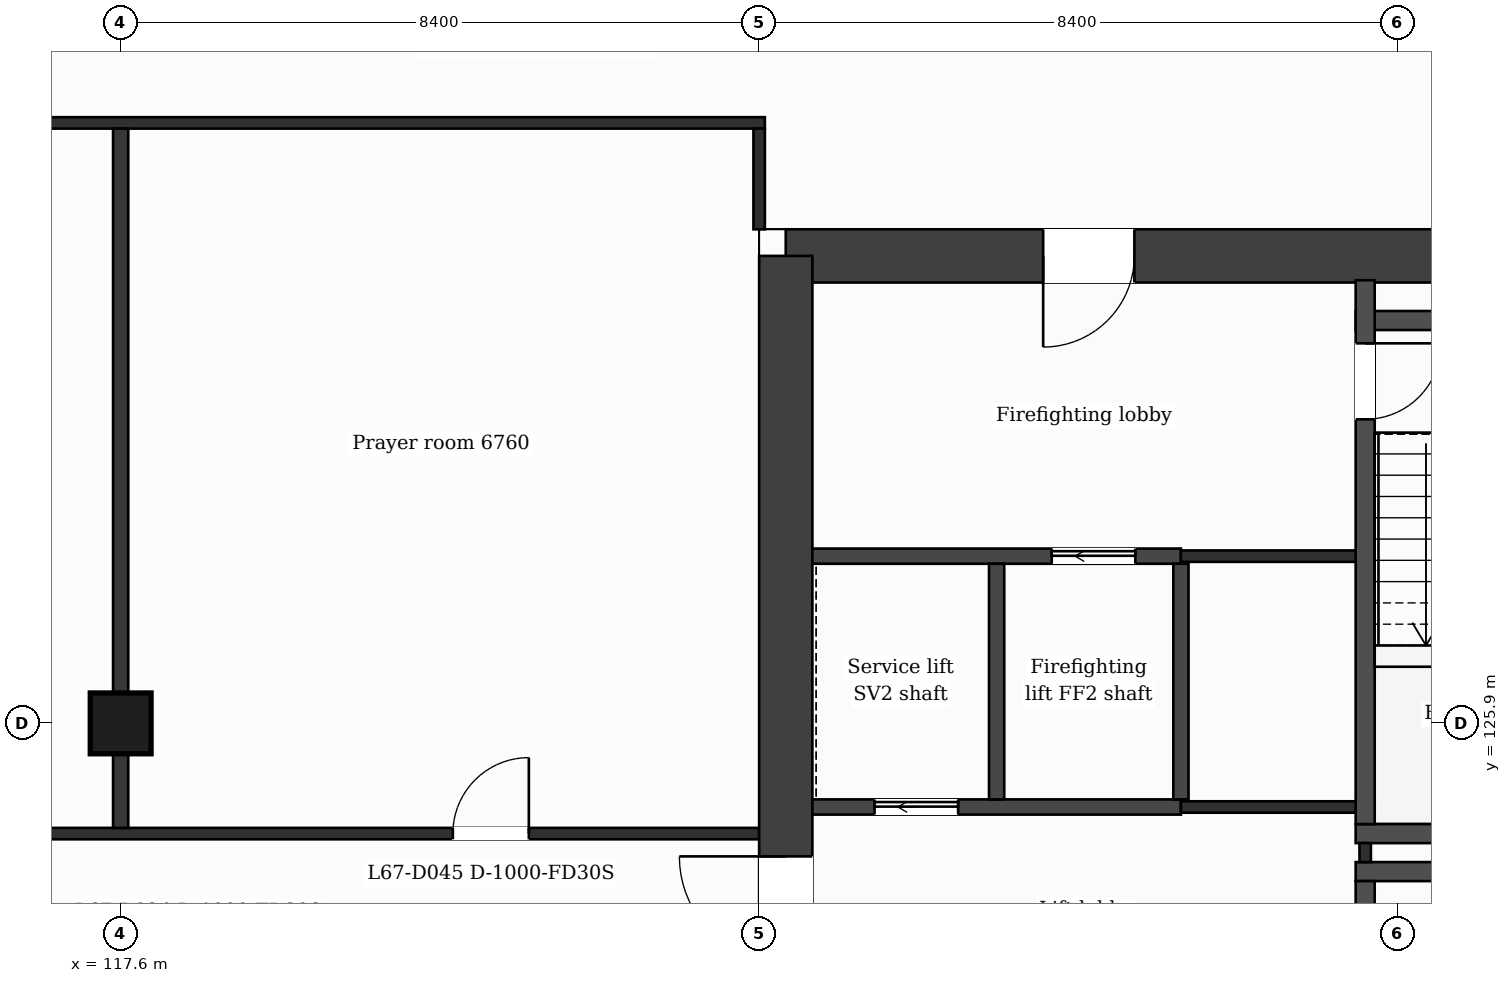
"""IFC4 building model, lengths in metres.
Left out: names, types, materials, properties, quantities, classifications, styles, units other than length and angle.
Written with IfcOpenShell. Run it as: python <this file> out.ifc"""

import sys

from ifc_helpers import new_model, si_unit, direction, frame, frame_2d, origin, origin_2d, place, context, subcontext, project, spatial, rectangle, extrude, element, fill, save


model = new_model("IFC4")
c1 = context("Model", 3, precision=1e-05, world=origin(), true_north=direction((0.0, 1.0)))
c2 = subcontext(c1, "Body", "Model", "MODEL_VIEW")
j1 = project(units=[si_unit("LENGTHUNIT", "METRE"), si_unit("PLANEANGLEUNIT", "RADIAN")], contexts=[c1])
p1 = place(None, origin())
s1 = spatial("IfcSite", under=j1, at=p1, CompositionType="ELEMENT")
p2 = place(p1, origin())
s2 = spatial("IfcBuilding", under=s1, at=p2, CompositionType="ELEMENT")
p3 = place(p2, frame((0.0, 0.0, 277.5)))
s3 = spatial("IfcBuildingStorey", under=s2, at=p3, CompositionType="ELEMENT", Elevation=277.5)
p4 = place(p3, frame((126.35, 132.05, 0.0), z_axis=(0.0, 0.0, 1.0), x_axis=(1.0, 0.0, 0.0)))
e1 = element("IfcWall", 1, at=p4, inside=s3, PredefinedType="SHEAR", context=c2, shape_type="SweptSolid", body=[
    extrude(rectangle(XDim=11.513, YDim=0.7, at=frame_2d((5.757, 0.0))), origin(), (0.0, 0.0, 1.0), 3.7),
])
p5 = place(p4, frame((3.386, 0.0, 0.0)))
e2 = element("IfcOpeningElement", 2, at=p5, cuts=e1, PredefinedType="OPENING", context=c2, shape_type="SweptSolid", body=[
    extrude(rectangle(XDim=1.2, YDim=2.1, at=frame_2d((0.6, 1.05))), frame((0.0, 0.36, 0.0), z_axis=(0.0, -1.0, 0.0), x_axis=(1.0, 0.0, 0.0)), (0.0, 0.0, 1.0), 0.72),
])
p6 = place(p3, frame((126.35, 110.75, 0.0), z_axis=(0.0, 0.0, 1.0), x_axis=(0.0, 1.0, 0.0)))
e3 = element("IfcWall", 3, at=p6, inside=s3, PredefinedType="SHEAR", context=c2, shape_type="SweptSolid", body=[
    extrude(rectangle(XDim=21.3, YDim=0.7, at=frame_2d((10.65, 0.0))), origin(), (0.0, 0.0, 1.0), 3.7),
])
p7 = place(p6, frame((12.0, 0.0, 0.0)))
e4 = element("IfcOpeningElement", 4, at=p7, cuts=e3, PredefinedType="OPENING", context=c2, shape_type="SweptSolid", body=[
    extrude(rectangle(XDim=1.4, YDim=2.1, at=frame_2d((0.7, 1.05))), frame((0.0, 0.36, 0.0), z_axis=(0.0, -1.0, 0.0), x_axis=(1.0, 0.0, 0.0)), (0.0, 0.0, 1.0), 0.72),
])
p8 = place(p3, frame((117.6, 125.9, 0.0), z_axis=(0.0, 0.0, 1.0), x_axis=(1.0, 0.0, 0.0)))
e5 = element("IfcColumn", 5, at=p8, inside=s3, PredefinedType="COLUMN", context=c2, shape_type="SweptSolid", body=[
    extrude(rectangle(XDim=0.8, YDim=0.8, at=origin_2d()), origin(), (0.0, 0.0, 1.0), 3.7),
])
for number, where, z_axis, x_axis in (
    (6, (133.848, 123.95, 0.0), (0.0, 0.0, 1.0), (1.0, 0.0, 0.0)),
    (7, (133.848, 124.45, 0.0), (0.0, 0.0, 1.0), (1.0, 0.0, 0.0)),
):
    element("IfcWall", number, at=place(p3, frame(where, z_axis=z_axis, x_axis=x_axis)), inside=s3, PredefinedType="PARTITIONING", context=c2, shape_type="SweptSolid", body=[
        extrude(rectangle(XDim=3.4, YDim=0.25, at=frame_2d((1.7, 0.0))), origin(), (0.0, 0.0, 1.0), 3.38),
    ])
p9 = place(p3, frame((100.8, 124.45, 0.0), z_axis=(0.0, 0.0, 1.0), x_axis=(1.0, 0.0, 0.0)))
e8 = element("IfcWall", 8, at=p9, inside=s3, PredefinedType="PARTITIONING", context=c2, shape_type="SweptSolid", body=[
    extrude(rectangle(XDim=25.2, YDim=0.15, at=frame_2d((12.6, 0.0))), origin(), (0.0, 0.0, 1.0), 3.38),
])
p10 = place(p9, frame((6.125, 0.0, 0.0)))
e9 = element("IfcOpeningElement", 9, at=p10, cuts=e8, PredefinedType="OPENING", context=c2, shape_type="SweptSolid", body=[
    extrude(rectangle(XDim=1.0, YDim=2.1, at=frame_2d((0.5, 1.05))), frame((0.0, 0.085, 0.0), z_axis=(0.0, -1.0, 0.0), x_axis=(1.0, 0.0, 0.0)), (0.0, 0.0, 1.0), 0.17),
])
p11 = place(p9, frame((1.325, 0.0, 0.0)))
e10 = element("IfcOpeningElement", 10, at=p11, cuts=e8, PredefinedType="OPENING", context=c2, shape_type="SweptSolid", body=[
    extrude(rectangle(XDim=1.0, YDim=2.1, at=frame_2d((0.5, 1.05))), frame((0.0, 0.085, 0.0), z_axis=(0.0, -1.0, 0.0), x_axis=(1.0, 0.0, 0.0)), (0.0, 0.0, 1.0), 0.17),
])
p12 = place(p9, frame((11.43, 0.0, 0.0)))
e11 = element("IfcOpeningElement", 11, at=p12, cuts=e8, PredefinedType="OPENING", context=c2, shape_type="SweptSolid", body=[
    extrude(rectangle(XDim=1.0, YDim=2.1, at=frame_2d((0.5, 1.05))), frame((0.0, 0.085, 0.0), z_axis=(0.0, -1.0, 0.0), x_axis=(1.0, 0.0, 0.0)), (0.0, 0.0, 1.0), 0.17),
])
p13 = place(p9, frame((21.17, 0.0, 0.0)))
e12 = element("IfcOpeningElement", 12, at=p13, cuts=e8, PredefinedType="OPENING", context=c2, shape_type="SweptSolid", body=[
    extrude(rectangle(XDim=1.0, YDim=2.1, at=frame_2d((0.5, 1.05))), frame((0.0, 0.085, 0.0), z_axis=(0.0, -1.0, 0.0), x_axis=(1.0, 0.0, 0.0)), (0.0, 0.0, 1.0), 0.17),
])
p14 = place(p3, frame((126.7, 124.8, 0.0), z_axis=(0.0, 0.0, 1.0), x_axis=(1.0, 0.0, 0.0)))
e13 = element("IfcWall", 13, at=p14, inside=s3, PredefinedType="PARTITIONING", context=c2, shape_type="SweptSolid", body=[
    extrude(rectangle(XDim=4.849, YDim=0.2, at=frame_2d((2.424, 0.0))), origin(), (0.0, 0.0, 1.0), 3.38),
])
p15 = place(p14, frame((0.818, 0.0, 0.0)))
e14 = element("IfcOpeningElement", 14, at=p15, cuts=e13, PredefinedType="OPENING", context=c2, shape_type="SweptSolid", body=[
    extrude(rectangle(XDim=1.1, YDim=2.1, at=frame_2d((0.55, 1.05))), frame((0.0, 0.11, 0.0), z_axis=(0.0, -1.0, 0.0), x_axis=(1.0, 0.0, 0.0)), (0.0, 0.0, 1.0), 0.22),
])
p16 = place(p3, frame((131.549, 124.8, 0.0), z_axis=(0.0, 0.0, 1.0), x_axis=(1.0, 0.0, 0.0)))
e15 = element("IfcWall", 15, at=p16, inside=s3, PredefinedType="PARTITIONING", context=c2, shape_type="SweptSolid", body=[
    extrude(rectangle(XDim=2.549, YDim=0.15, at=frame_2d((1.275, 0.0))), origin(), (0.0, 0.0, 1.0), 3.38),
])
p17 = place(p3, frame((126.7, 128.1, 0.0), z_axis=(0.0, 0.0, 1.0), x_axis=(1.0, 0.0, 0.0)))
e16 = element("IfcWall", 16, at=p17, inside=s3, PredefinedType="PARTITIONING", context=c2, shape_type="SweptSolid", body=[
    extrude(rectangle(XDim=4.849, YDim=0.2, at=frame_2d((2.424, 0.0))), origin(), (0.0, 0.0, 1.0), 3.38),
])
p18 = place(p17, frame((3.149, 0.0, 0.0)))
e17 = element("IfcOpeningElement", 17, at=p18, cuts=e16, PredefinedType="OPENING", context=c2, shape_type="SweptSolid", body=[
    extrude(rectangle(XDim=1.1, YDim=2.1, at=frame_2d((0.55, 1.05))), frame((0.0, 0.11, 0.0), z_axis=(0.0, -1.0, 0.0), x_axis=(1.0, 0.0, 0.0)), (0.0, 0.0, 1.0), 0.22),
])
p19 = place(p3, frame((131.549, 128.1, 0.0), z_axis=(0.0, 0.0, 1.0), x_axis=(1.0, 0.0, 0.0)))
e18 = element("IfcWall", 18, at=p19, inside=s3, PredefinedType="PARTITIONING", context=c2, shape_type="SweptSolid", body=[
    extrude(rectangle(XDim=2.424, YDim=0.15, at=frame_2d((1.212, 0.0))), origin(), (0.0, 0.0, 1.0), 3.38),
])
p20 = place(p3, frame((133.848, 131.2, 0.0), z_axis=(0.0, 0.0, 1.0), x_axis=(1.0, 0.0, 0.0)))
e19 = element("IfcWall", 19, at=p20, inside=s3, PredefinedType="PARTITIONING", context=c2, shape_type="SweptSolid", body=[
    extrude(rectangle(XDim=3.807, YDim=0.25, at=frame_2d((1.903, 0.0))), origin(), (0.0, 0.0, 1.0), 3.38),
])
p21 = place(p3, frame((100.725, 133.8, 0.0), z_axis=(0.0, 0.0, 1.0), x_axis=(1.0, 0.0, 0.0)))
e20 = element("IfcWall", 20, at=p21, inside=s3, PredefinedType="PARTITIONING", context=c2, shape_type="SweptSolid", body=[
    extrude(rectangle(XDim=25.35, YDim=0.15, at=frame_2d((12.675, 0.0))), origin(), (0.0, 0.0, 1.0), 3.38),
])
p22 = place(p3, frame((117.6, 124.525, 0.0), z_axis=(0.0, 0.0, 1.0), x_axis=(0.0, 1.0, 0.0)))
e21 = element("IfcWall", 21, at=p22, inside=s3, PredefinedType="PARTITIONING", context=c2, shape_type="SweptSolid", body=[
    extrude(rectangle(XDim=9.2, YDim=0.2, at=frame_2d((4.6, 0.0))), origin(), (0.0, 0.0, 1.0), 3.38),
])
p23 = place(p3, frame((126.0, 132.4, 0.0), z_axis=(0.0, 0.0, 1.0), x_axis=(0.0, 1.0, 0.0)))
e22 = element("IfcWall", 22, at=p23, inside=s3, PredefinedType="PARTITIONING", context=c2, shape_type="SweptSolid", body=[
    extrude(rectangle(XDim=1.325, YDim=0.15, at=frame_2d((0.663, 0.0))), origin(), (0.0, 0.0, 1.0), 3.38),
])
for number, where, z_axis, x_axis in (
    (23, (129.124, 124.9, 0.0), (0.0, 0.0, 1.0), (0.0, 1.0, 0.0)),
    (24, (131.549, 124.9, 0.0), (0.0, 0.0, 1.0), (0.0, 1.0, 0.0)),
):
    element("IfcWall", number, at=place(p3, frame(where, z_axis=z_axis, x_axis=x_axis)), inside=s3, PredefinedType="PARTITIONING", context=c2, shape_type="SweptSolid", body=[
        extrude(rectangle(XDim=3.1, YDim=0.2, at=frame_2d((1.55, 0.0))), origin(), (0.0, 0.0, 1.0), 3.38),
    ])
p24 = place(p3, frame((133.973, 124.075, 0.0), z_axis=(0.0, 0.0, 1.0), x_axis=(0.0, 1.0, 0.0)))
e25 = element("IfcWall", 25, at=p24, inside=s3, PredefinedType="PARTITIONING", context=c2, shape_type="SweptSolid", body=[
    extrude(rectangle(XDim=0.25, YDim=0.15, at=frame_2d((0.125, 0.0))), origin(), (0.0, 0.0, 1.0), 3.38),
])
p25 = place(p3, frame((133.973, 116.67, 0.0), z_axis=(0.0, 0.0, 1.0), x_axis=(0.0, 1.0, 0.0)))
e26 = element("IfcWall", 26, at=p25, inside=s3, PredefinedType="PARTITIONING", context=c2, shape_type="SweptSolid", body=[
    extrude(rectangle(XDim=7.155, YDim=0.25, at=frame_2d((3.578, 0.0))), origin(), (0.0, 0.0, 1.0), 3.38),
])
p26 = place(p25, frame((5.855, 0.0, 0.0)))
e27 = element("IfcOpeningElement", 27, at=p26, cuts=e26, PredefinedType="OPENING", context=c2, shape_type="SweptSolid", body=[
    extrude(rectangle(XDim=0.95, YDim=2.1, at=frame_2d((0.475, 1.05))), frame((0.0, 0.135, 0.0), z_axis=(0.0, -1.0, 0.0), x_axis=(1.0, 0.0, 0.0)), (0.0, 0.0, 1.0), 0.27),
])
p27 = place(p3, frame((133.973, 124.575, 0.0), z_axis=(0.0, 0.0, 1.0), x_axis=(0.0, 1.0, 0.0)))
e28 = element("IfcWall", 28, at=p27, inside=s3, PredefinedType="PARTITIONING", context=c2, shape_type="SweptSolid", body=[
    extrude(rectangle(XDim=7.155, YDim=0.25, at=frame_2d((3.578, 0.0))), origin(), (0.0, 0.0, 1.0), 3.38),
])
p28 = place(p27, frame((5.325, 0.0, 0.0)))
e29 = element("IfcOpeningElement", 29, at=p28, cuts=e28, PredefinedType="OPENING", context=c2, shape_type="SweptSolid", body=[
    extrude(rectangle(XDim=1.0, YDim=2.1, at=frame_2d((0.5, 1.05))), frame((0.0, 0.135, 0.0), z_axis=(0.0, -1.0, 0.0), x_axis=(1.0, 0.0, 0.0)), (0.0, 0.0, 1.0), 0.27),
])
p29 = place(p18, origin())
e30 = element("IfcDoor", 30, at=p29, inside=s3, OperationType="SLIDING_TO_LEFT", PredefinedType="DOOR", context=c2, shape_type="SweptSolid", body=[
    extrude(rectangle(XDim=1.1, YDim=2.1, at=frame_2d((0.55, 1.05))), frame((0.0, 0.025, 0.0), z_axis=(0.0, -1.0, 0.0), x_axis=(1.0, 0.0, 0.0)), (0.0, 0.0, 1.0), 0.05),
])
fill(e17, e30)
p30 = place(p15, origin())
e31 = element("IfcDoor", 31, at=p30, inside=s3, OperationType="SLIDING_TO_LEFT", PredefinedType="DOOR", context=c2, shape_type="SweptSolid", body=[
    extrude(rectangle(XDim=1.1, YDim=2.1, at=frame_2d((0.55, 1.05))), frame((0.0, 0.025, 0.0), z_axis=(0.0, -1.0, 0.0), x_axis=(1.0, 0.0, 0.0)), (0.0, 0.0, 1.0), 0.05),
])
fill(e14, e31)
p31 = place(p28, origin())
e32 = element("IfcDoor", 32, at=p31, inside=s3, OperationType="SINGLE_SWING_RIGHT", PredefinedType="DOOR", context=c2, shape_type="SweptSolid", body=[
    extrude(rectangle(XDim=1.0, YDim=2.1, at=frame_2d((0.5, 1.05))), frame((0.0, 0.025, 0.0), z_axis=(0.0, -1.0, 0.0), x_axis=(1.0, 0.0, 0.0)), (0.0, 0.0, 1.0), 0.05),
])
fill(e29, e32)
p32 = place(p13, origin())
e33 = element("IfcDoor", 33, at=p32, inside=s3, OperationType="SINGLE_SWING_RIGHT", PredefinedType="DOOR", context=c2, shape_type="SweptSolid", body=[
    extrude(rectangle(XDim=1.0, YDim=2.1, at=frame_2d((0.5, 1.05))), frame((0.0, 0.025, 0.0), z_axis=(0.0, -1.0, 0.0), x_axis=(1.0, 0.0, 0.0)), (0.0, 0.0, 1.0), 0.05),
])
fill(e12, e33)
p33 = place(p5, origin())
e34 = element("IfcDoor", 34, at=p33, inside=s3, OperationType="SINGLE_SWING_LEFT", PredefinedType="DOOR", context=c2, shape_type="SweptSolid", body=[
    extrude(rectangle(XDim=1.2, YDim=2.1, at=frame_2d((0.6, 1.05))), frame((0.0, 0.025, 0.0), z_axis=(0.0, -1.0, 0.0), x_axis=(1.0, 0.0, 0.0)), (0.0, 0.0, 1.0), 0.05),
])
fill(e2, e34)
p34 = place(p7, origin())
e35 = element("IfcDoor", 35, at=p34, inside=s3, OperationType="SINGLE_SWING_RIGHT", PredefinedType="DOOR", context=c2, shape_type="SweptSolid", body=[
    extrude(rectangle(XDim=1.4, YDim=2.1, at=frame_2d((0.7, 1.05))), frame((0.0, 0.025, 0.0), z_axis=(0.0, -1.0, 0.0), x_axis=(1.0, 0.0, 0.0)), (0.0, 0.0, 1.0), 0.05),
])
fill(e4, e35)
save(model, sys.argv[1])
